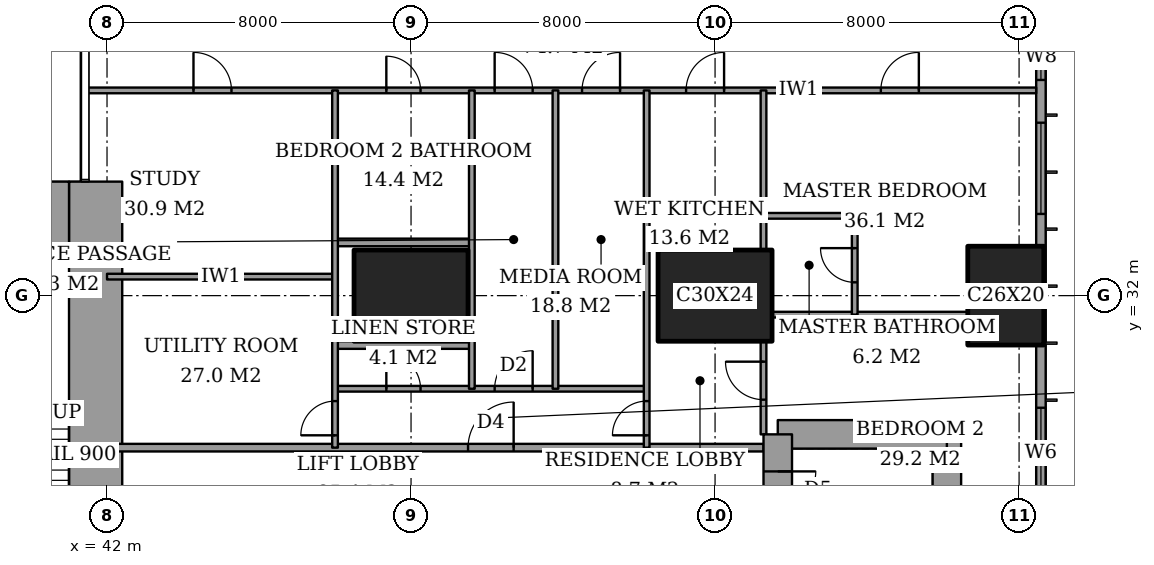
"""IFC4 building model, lengths in metres.
Left out: names, types, materials, properties, quantities, classifications, styles, units other than length and angle.
Written with IfcOpenShell. Run it as: python <this file> out.ifc"""

import sys

from ifc_helpers import new_model, si_unit, direction, frame, frame_2d, origin, origin_2d, place, context, subcontext, project, spatial, rectangle, extrude, element, fill, save


model = new_model("IFC4")
c1 = context("Model", 3, precision=1e-05, world=origin(), true_north=direction((0.0, 1.0)))
c2 = subcontext(c1, "Body", "Model", "MODEL_VIEW")
j1 = project(units=[si_unit("LENGTHUNIT", "METRE"), si_unit("PLANEANGLEUNIT", "RADIAN")], contexts=[c1])
p1 = place(None, origin())
s1 = spatial("IfcSite", under=j1, at=p1, CompositionType="ELEMENT")
p2 = place(p1, origin())
s2 = spatial("IfcBuilding", under=s1, at=p2, CompositionType="ELEMENT")
p3 = place(p2, frame((0.0, 0.0, 76.4)))
s3 = spatial("IfcBuildingStorey", under=s2, at=p3, CompositionType="ELEMENT", Elevation=76.4)
for number, where, z_axis, x_axis in (
    (1, (50.0, 32.0, 0.0), (0.0, 0.0, 1.0), (1.0, 0.0, 0.0)),
    (2, (58.0, 32.0, 0.0), (0.0, 0.0, 1.0), (1.0, 0.0, 0.0)),
):
    element("IfcColumn", number, at=place(p3, frame(where, z_axis=z_axis, x_axis=x_axis)), inside=s3, PredefinedType="COLUMN", context=c2, shape_type="SweptSolid", body=[
        extrude(rectangle(XDim=3.0, YDim=2.4, at=origin_2d()), origin(), (0.0, 0.0, 1.0), 3.6),
    ])
p4 = place(p3, frame((65.65, 32.0, 0.0), z_axis=(0.0, 0.0, 1.0), x_axis=(0.0, 1.0, 0.0)))
e3 = element("IfcColumn", 3, at=p4, inside=s3, PredefinedType="COLUMN", context=c2, shape_type="SweptSolid", body=[
    extrude(rectangle(XDim=2.6, YDim=2.0, at=origin_2d()), origin(), (0.0, 0.0, 1.0), 3.6),
])
p5 = place(p3, frame((37.85, 34.0, 0.0), z_axis=(0.0, 0.0, 1.0), x_axis=(1.0, 0.0, 0.0)))
e4 = element("IfcWall", 4, at=p5, inside=s3, PredefinedType="SHEAR", context=c2, shape_type="SweptSolid", body=[
    extrude(rectangle(XDim=3.15, YDim=2.0, at=frame_2d((1.575, 0.0))), origin(), (0.0, 0.0, 1.0), 3.6),
])
p6 = place(p3, frame((41.7, 24.85, 0.0), z_axis=(0.0, 0.0, 1.0), x_axis=(0.0, 1.0, 0.0)))
e5 = element("IfcWall", 5, at=p6, inside=s3, PredefinedType="SHEAR", context=c2, shape_type="SweptSolid", body=[
    extrude(rectangle(XDim=10.15, YDim=1.4, at=frame_2d((5.075, 0.0))), origin(), (0.0, 0.0, 1.0), 3.6),
])
p7 = place(p3, frame((64.1, 19.65, 0.0), z_axis=(0.0, 0.0, 1.0), x_axis=(0.0, 1.0, 0.0)))
e6 = element("IfcWall", 6, at=p7, inside=s3, PredefinedType="SHEAR", context=c2, shape_type="SweptSolid", body=[
    extrude(rectangle(XDim=8.7, YDim=0.75, at=frame_2d((4.35, 0.0))), origin(), (0.0, 0.0, 1.0), 3.6),
])
p8 = place(p3, frame((64.1, 28.35, 0.0), z_axis=(0.0, 0.0, 1.0), x_axis=(-1.0, 0.0, 0.0)))
e7 = element("IfcWall", 7, at=p8, inside=s3, PredefinedType="SHEAR", context=c2, shape_type="SweptSolid", body=[
    extrude(rectangle(XDim=4.45, YDim=0.75, at=frame_2d((2.225, 0.0))), origin(), (0.0, 0.0, 1.0), 3.6),
])
p9 = place(p3, frame((59.65, 28.35, 0.0), z_axis=(0.0, 0.0, 1.0), x_axis=(0.0, -1.0, 0.0)))
e8 = element("IfcWall", 8, at=p9, inside=s3, PredefinedType="SHEAR", context=c2, shape_type="SweptSolid", body=[
    extrude(rectangle(XDim=8.7, YDim=0.75, at=frame_2d((4.35, 0.0))), origin(), (0.0, 0.0, 1.0), 3.6),
])
p10 = place(p9, frame((0.975, 0.0, 0.0)))
e9 = element("IfcOpeningElement", 9, at=p10, cuts=e8, PredefinedType="OPENING", context=c2, shape_type="SweptSolid", body=[
    extrude(rectangle(XDim=1.0, YDim=2.1, at=frame_2d((0.5, 1.05))), frame((0.0, 0.385, 0.0), z_axis=(0.0, -1.0, 0.0), x_axis=(1.0, 0.0, 0.0)), (0.0, 0.0, 1.0), 0.77),
])
p11 = place(p3, frame((66.575, 3.175, 0.0), z_axis=(0.0, 0.0, 1.0), x_axis=(0.0, 1.0, 0.0)))
e10 = element("IfcWall", 10, at=p11, inside=s3, PredefinedType="SOLIDWALL", context=c2, shape_type="SweptSolid", body=[
    extrude(rectangle(XDim=41.65, YDim=0.25, at=frame_2d((20.825, 0.0))), origin(), (0.0, 0.0, 1.0), 3.6),
])
p12 = place(p11, frame((0.775, 0.0, 0.6)))
e11 = element("IfcOpeningElement", 11, at=p12, cuts=e10, PredefinedType="OPENING", context=c2, shape_type="SweptSolid", body=[
    extrude(rectangle(XDim=2.4, YDim=2.0, at=frame_2d((1.2, 1.0))), frame((0.0, 0.135, 0.0), z_axis=(0.0, -1.0, 0.0), x_axis=(1.0, 0.0, 0.0)), (0.0, 0.0, 1.0), 0.27),
])
p13 = place(p11, frame((6.1, 0.0, 0.6)))
e12 = element("IfcOpeningElement", 12, at=p13, cuts=e10, PredefinedType="OPENING", context=c2, shape_type="SweptSolid", body=[
    extrude(rectangle(XDim=1.2, YDim=2.0, at=frame_2d((0.6, 1.0))), frame((0.0, 0.135, 0.0), z_axis=(0.0, -1.0, 0.0), x_axis=(1.0, 0.0, 0.0)), (0.0, 0.0, 1.0), 0.27),
])
p14 = place(p11, frame((8.275, 0.0, 0.6)))
e13 = element("IfcOpeningElement", 13, at=p14, cuts=e10, PredefinedType="OPENING", context=c2, shape_type="SweptSolid", body=[
    extrude(rectangle(XDim=2.4, YDim=2.0, at=frame_2d((1.2, 1.0))), frame((0.0, 0.135, 0.0), z_axis=(0.0, -1.0, 0.0), x_axis=(1.0, 0.0, 0.0)), (0.0, 0.0, 1.0), 0.27),
])
p15 = place(p11, frame((15.775, 0.0, 0.6)))
e14 = element("IfcOpeningElement", 14, at=p15, cuts=e10, PredefinedType="OPENING", context=c2, shape_type="SweptSolid", body=[
    extrude(rectangle(XDim=2.4, YDim=2.0, at=frame_2d((1.2, 1.0))), frame((0.0, 0.135, 0.0), z_axis=(0.0, -1.0, 0.0), x_axis=(1.0, 0.0, 0.0)), (0.0, 0.0, 1.0), 0.27),
])
p16 = place(p11, frame((23.475, 0.0, 0.6)))
e15 = element("IfcOpeningElement", 15, at=p16, cuts=e10, PredefinedType="OPENING", context=c2, shape_type="SweptSolid", body=[
    extrude(rectangle(XDim=2.4, YDim=2.0, at=frame_2d((1.2, 1.0))), frame((0.0, 0.135, 0.0), z_axis=(0.0, -1.0, 0.0), x_axis=(1.0, 0.0, 0.0)), (0.0, 0.0, 1.0), 0.27),
])
p17 = place(p11, frame((30.975, 0.0, 0.6)))
e16 = element("IfcOpeningElement", 16, at=p17, cuts=e10, PredefinedType="OPENING", context=c2, shape_type="SweptSolid", body=[
    extrude(rectangle(XDim=2.4, YDim=2.0, at=frame_2d((1.2, 1.0))), frame((0.0, 0.135, 0.0), z_axis=(0.0, -1.0, 0.0), x_axis=(1.0, 0.0, 0.0)), (0.0, 0.0, 1.0), 0.27),
])
p18 = place(p11, frame((34.5, 0.0, 0.6)))
e17 = element("IfcOpeningElement", 17, at=p18, cuts=e10, PredefinedType="OPENING", context=c2, shape_type="SweptSolid", body=[
    extrude(rectangle(XDim=1.2, YDim=2.0, at=frame_2d((0.6, 1.0))), frame((0.0, 0.135, 0.0), z_axis=(0.0, -1.0, 0.0), x_axis=(1.0, 0.0, 0.0)), (0.0, 0.0, 1.0), 0.27),
])
p19 = place(p11, frame((38.475, 0.0, 0.6)))
e18 = element("IfcOpeningElement", 18, at=p19, cuts=e10, PredefinedType="OPENING", context=c2, shape_type="SweptSolid", body=[
    extrude(rectangle(XDim=2.4, YDim=2.0, at=frame_2d((1.2, 1.0))), frame((0.0, 0.135, 0.0), z_axis=(0.0, -1.0, 0.0), x_axis=(1.0, 0.0, 0.0)), (0.0, 0.0, 1.0), 0.27),
])
p20 = place(p3, frame((42.0, 28.0, 0.0), z_axis=(0.0, 0.0, 1.0), x_axis=(1.0, 0.0, 0.0)))
e19 = element("IfcWall", 19, at=p20, inside=s3, PredefinedType="PARTITIONING", context=c2, shape_type="SweptSolid", body=[
    extrude(rectangle(XDim=17.275, YDim=0.2, at=frame_2d((8.637, 0.0))), origin(), (0.0, 0.0, 1.0), 3.35),
])
p21 = place(p20, frame((9.5, 0.0, 0.0)))
e20 = element("IfcOpeningElement", 20, at=p21, cuts=e19, PredefinedType="OPENING", context=c2, shape_type="SweptSolid", body=[
    extrude(rectangle(XDim=1.2, YDim=2.4, at=frame_2d((0.6, 1.2))), frame((0.0, 0.11, 0.0), z_axis=(0.0, -1.0, 0.0), x_axis=(1.0, 0.0, 0.0)), (0.0, 0.0, 1.0), 0.22),
])
p22 = place(p3, frame((48.0, 29.55, 0.0), z_axis=(0.0, 0.0, 1.0), x_axis=(1.0, 0.0, 0.0)))
e21 = element("IfcWall", 21, at=p22, inside=s3, PredefinedType="PARTITIONING", context=c2, shape_type="SweptSolid", body=[
    extrude(rectangle(XDim=8.2, YDim=0.15, at=frame_2d((4.1, 0.0))), origin(), (0.0, 0.0, 1.0), 3.35),
])
p23 = place(p22, frame((4.2, 0.0, 0.0)))
e22 = element("IfcOpeningElement", 22, at=p23, cuts=e21, PredefinedType="OPENING", context=c2, shape_type="SweptSolid", body=[
    extrude(rectangle(XDim=1.0, YDim=2.1, at=frame_2d((0.5, 1.05))), frame((0.0, 0.085, 0.0), z_axis=(0.0, -1.0, 0.0), x_axis=(1.0, 0.0, 0.0)), (0.0, 0.0, 1.0), 0.17),
])
p24 = place(p22, frame((1.35, 0.0, 0.0)))
e23 = element("IfcOpeningElement", 23, at=p24, cuts=e21, PredefinedType="OPENING", context=c2, shape_type="SweptSolid", body=[
    extrude(rectangle(XDim=0.9, YDim=2.1, at=frame_2d((0.45, 1.05))), frame((0.0, 0.085, 0.0), z_axis=(0.0, -1.0, 0.0), x_axis=(1.0, 0.0, 0.0)), (0.0, 0.0, 1.0), 0.17),
])
p25 = place(p3, frame((48.0, 30.7, 0.0), z_axis=(0.0, 0.0, 1.0), x_axis=(1.0, 0.0, 0.0)))
e24 = element("IfcWall", 24, at=p25, inside=s3, PredefinedType="PARTITIONING", context=c2, shape_type="SweptSolid", body=[
    extrude(rectangle(XDim=3.6, YDim=0.2, at=frame_2d((1.8, 0.0))), origin(), (0.0, 0.0, 1.0), 3.35),
])
p26 = place(p3, frame((59.5, 31.5, 0.0), z_axis=(0.0, 0.0, 1.0), x_axis=(1.0, 0.0, 0.0)))
e25 = element("IfcWall", 25, at=p26, inside=s3, PredefinedType="PARTITIONING", context=c2, shape_type="SweptSolid", body=[
    extrude(rectangle(XDim=5.15, YDim=0.15, at=frame_2d((2.575, 0.0))), origin(), (0.0, 0.0, 1.0), 3.35),
])
p27 = place(p3, frame((42.0, 32.5, 0.0), z_axis=(0.0, 0.0, 1.0), x_axis=(1.0, 0.0, 0.0)))
e26 = element("IfcWall", 26, at=p27, inside=s3, PredefinedType="PARTITIONING", context=c2, shape_type="SweptSolid", body=[
    extrude(rectangle(XDim=6.0, YDim=0.15, at=frame_2d((3.0, 0.0))), origin(), (0.0, 0.0, 1.0), 3.35),
])
p28 = place(p3, frame((48.0, 33.4, 0.0), z_axis=(0.0, 0.0, 1.0), x_axis=(1.0, 0.0, 0.0)))
e27 = element("IfcWall", 27, at=p28, inside=s3, PredefinedType="PARTITIONING", context=c2, shape_type="SweptSolid", body=[
    extrude(rectangle(XDim=3.6, YDim=0.2, at=frame_2d((1.8, 0.0))), origin(), (0.0, 0.0, 1.0), 3.35),
])
p29 = place(p3, frame((59.275, 34.1, 0.0), z_axis=(0.0, 0.0, 1.0), x_axis=(1.0, 0.0, 0.0)))
e28 = element("IfcWall", 28, at=p29, inside=s3, PredefinedType="PARTITIONING", context=c2, shape_type="SweptSolid", body=[
    extrude(rectangle(XDim=2.4, YDim=0.15, at=frame_2d((1.2, 0.0))), origin(), (0.0, 0.0, 1.0), 3.35),
])
p30 = place(p3, frame((41.439, 37.4, 0.0), z_axis=(0.0, 0.0, 1.0), x_axis=(1.0, 0.0, 0.0)))
e29 = element("IfcWall", 29, at=p30, inside=s3, PredefinedType="PARTITIONING", context=c2, shape_type="SweptSolid", body=[
    extrude(rectangle(XDim=25.011, YDim=0.15, at=frame_2d((12.505, 0.0))), origin(), (0.0, 0.0, 1.0), 3.35),
])
p31 = place(p30, frame((10.761, 0.0, 0.0)))
e30 = element("IfcOpeningElement", 30, at=p31, cuts=e29, PredefinedType="OPENING", context=c2, shape_type="SweptSolid", body=[
    extrude(rectangle(XDim=1.0, YDim=2.1, at=frame_2d((0.5, 1.05))), frame((0.0, 0.085, 0.0), z_axis=(0.0, -1.0, 0.0), x_axis=(1.0, 0.0, 0.0)), (0.0, 0.0, 1.0), 0.17),
])
p32 = place(p30, frame((20.924, 0.0, 0.0)))
e31 = element("IfcOpeningElement", 31, at=p32, cuts=e29, PredefinedType="OPENING", context=c2, shape_type="SweptSolid", body=[
    extrude(rectangle(XDim=1.0, YDim=2.1, at=frame_2d((0.5, 1.05))), frame((0.0, 0.085, 0.0), z_axis=(0.0, -1.0, 0.0), x_axis=(1.0, 0.0, 0.0)), (0.0, 0.0, 1.0), 0.17),
])
p33 = place(p30, frame((15.799, 0.0, 0.0)))
e32 = element("IfcOpeningElement", 32, at=p33, cuts=e29, PredefinedType="OPENING", context=c2, shape_type="SweptSolid", body=[
    extrude(rectangle(XDim=1.0, YDim=2.1, at=frame_2d((0.5, 1.05))), frame((0.0, 0.085, 0.0), z_axis=(0.0, -1.0, 0.0), x_axis=(1.0, 0.0, 0.0)), (0.0, 0.0, 1.0), 0.17),
])
p34 = place(p30, frame((13.061, 0.0, 0.0)))
e33 = element("IfcOpeningElement", 33, at=p34, cuts=e29, PredefinedType="OPENING", context=c2, shape_type="SweptSolid", body=[
    extrude(rectangle(XDim=1.0, YDim=2.1, at=frame_2d((0.5, 1.05))), frame((0.0, 0.085, 0.0), z_axis=(0.0, -1.0, 0.0), x_axis=(1.0, 0.0, 0.0)), (0.0, 0.0, 1.0), 0.17),
])
p35 = place(p30, frame((7.911, 0.0, 0.0)))
e34 = element("IfcOpeningElement", 34, at=p35, cuts=e29, PredefinedType="OPENING", context=c2, shape_type="SweptSolid", body=[
    extrude(rectangle(XDim=0.9, YDim=2.1, at=frame_2d((0.45, 1.05))), frame((0.0, 0.085, 0.0), z_axis=(0.0, -1.0, 0.0), x_axis=(1.0, 0.0, 0.0)), (0.0, 0.0, 1.0), 0.17),
])
p36 = place(p30, frame((2.836, 0.0, 0.0)))
e35 = element("IfcOpeningElement", 35, at=p36, cuts=e29, PredefinedType="OPENING", context=c2, shape_type="SweptSolid", body=[
    extrude(rectangle(XDim=1.0, YDim=2.1, at=frame_2d((0.5, 1.05))), frame((0.0, 0.085, 0.0), z_axis=(0.0, -1.0, 0.0), x_axis=(1.0, 0.0, 0.0)), (0.0, 0.0, 1.0), 0.17),
])
p37 = place(p3, frame((48.0, 28.0, 0.0), z_axis=(0.0, 0.0, 1.0), x_axis=(0.0, 1.0, 0.0)))
e36 = element("IfcWall", 36, at=p37, inside=s3, PredefinedType="PARTITIONING", context=c2, shape_type="SweptSolid", body=[
    extrude(rectangle(XDim=9.4, YDim=0.15, at=frame_2d((4.7, 0.0))), origin(), (0.0, 0.0, 1.0), 3.35),
])
p38 = place(p37, frame((0.325, 0.0, 0.0)))
e37 = element("IfcOpeningElement", 37, at=p38, cuts=e36, PredefinedType="OPENING", context=c2, shape_type="SweptSolid", body=[
    extrude(rectangle(XDim=0.9, YDim=2.1, at=frame_2d((0.45, 1.05))), frame((0.0, 0.085, 0.0), z_axis=(0.0, -1.0, 0.0), x_axis=(1.0, 0.0, 0.0)), (0.0, 0.0, 1.0), 0.17),
])
for number, where, z_axis, x_axis in (
    (38, (51.6, 29.55, 0.0), (0.0, 0.0, 1.0), (0.0, 1.0, 0.0)),
    (39, (53.8, 29.55, 0.0), (0.0, 0.0, 1.0), (0.0, 1.0, 0.0)),
):
    element("IfcWall", number, at=place(p3, frame(where, z_axis=z_axis, x_axis=x_axis)), inside=s3, PredefinedType="PARTITIONING", context=c2, shape_type="SweptSolid", body=[
        extrude(rectangle(XDim=7.85, YDim=0.15, at=frame_2d((3.925, 0.0))), origin(), (0.0, 0.0, 1.0), 3.35),
    ])
p39 = place(p3, frame((56.2, 28.0, 0.0), z_axis=(0.0, 0.0, 1.0), x_axis=(0.0, 1.0, 0.0)))
e40 = element("IfcWall", 40, at=p39, inside=s3, PredefinedType="PARTITIONING", context=c2, shape_type="SweptSolid", body=[
    extrude(rectangle(XDim=9.4, YDim=0.15, at=frame_2d((4.7, 0.0))), origin(), (0.0, 0.0, 1.0), 3.35),
])
p40 = place(p39, frame((0.325, 0.0, 0.0)))
e41 = element("IfcOpeningElement", 41, at=p40, cuts=e40, PredefinedType="OPENING", context=c2, shape_type="SweptSolid", body=[
    extrude(rectangle(XDim=0.9, YDim=2.1, at=frame_2d((0.45, 1.05))), frame((0.0, 0.085, 0.0), z_axis=(0.0, -1.0, 0.0), x_axis=(1.0, 0.0, 0.0)), (0.0, 0.0, 1.0), 0.17),
])
p41 = place(p3, frame((59.275, 28.35, 0.0), z_axis=(0.0, 0.0, 1.0), x_axis=(0.0, 1.0, 0.0)))
e42 = element("IfcWall", 42, at=p41, inside=s3, PredefinedType="PARTITIONING", context=c2, shape_type="SweptSolid", body=[
    extrude(rectangle(XDim=2.45, YDim=0.15, at=frame_2d((1.225, 0.0))), origin(), (0.0, 0.0, 1.0), 3.35),
])
p42 = place(p41, frame((0.913, 0.0, 0.0)))
e43 = element("IfcOpeningElement", 43, at=p42, cuts=e42, PredefinedType="OPENING", context=c2, shape_type="SweptSolid", body=[
    extrude(rectangle(XDim=1.0, YDim=2.1, at=frame_2d((0.5, 1.05))), frame((0.0, 0.085, 0.0), z_axis=(0.0, -1.0, 0.0), x_axis=(1.0, 0.0, 0.0)), (0.0, 0.0, 1.0), 0.17),
])
p43 = place(p3, frame((59.275, 33.2, 0.0), z_axis=(0.0, 0.0, 1.0), x_axis=(0.0, 1.0, 0.0)))
e44 = element("IfcWall", 44, at=p43, inside=s3, PredefinedType="PARTITIONING", context=c2, shape_type="SweptSolid", body=[
    extrude(rectangle(XDim=4.2, YDim=0.15, at=frame_2d((2.1, 0.0))), origin(), (0.0, 0.0, 1.0), 3.35),
])
p44 = place(p3, frame((61.675, 31.5, 0.0), z_axis=(0.0, 0.0, 1.0), x_axis=(0.0, 1.0, 0.0)))
e45 = element("IfcWall", 45, at=p44, inside=s3, PredefinedType="PARTITIONING", context=c2, shape_type="SweptSolid", body=[
    extrude(rectangle(XDim=2.6, YDim=0.15, at=frame_2d((1.3, 0.0))), origin(), (0.0, 0.0, 1.0), 3.35),
])
p45 = place(p44, frame((0.85, 0.0, 0.0)))
e46 = element("IfcOpeningElement", 46, at=p45, cuts=e45, PredefinedType="OPENING", context=c2, shape_type="SweptSolid", body=[
    extrude(rectangle(XDim=0.9, YDim=2.1, at=frame_2d((0.45, 1.05))), frame((0.0, 0.085, 0.0), z_axis=(0.0, -1.0, 0.0), x_axis=(1.0, 0.0, 0.0)), (0.0, 0.0, 1.0), 0.17),
])
p46 = place(p16, origin())
e47 = element("IfcWindow", 47, at=p46, inside=s3, PartitioningType="SINGLE_PANEL", PredefinedType="WINDOW", context=c2, shape_type="SweptSolid", body=[
    extrude(rectangle(XDim=2.4, YDim=2.0, at=frame_2d((1.2, 1.0))), frame((0.0, 0.03, 0.0), z_axis=(0.0, -1.0, 0.0), x_axis=(1.0, 0.0, 0.0)), (0.0, 0.0, 1.0), 0.06),
])
fill(e15, e47)
p47 = place(p17, origin())
e48 = element("IfcWindow", 48, at=p47, inside=s3, PartitioningType="SINGLE_PANEL", PredefinedType="WINDOW", context=c2, shape_type="SweptSolid", body=[
    extrude(rectangle(XDim=2.4, YDim=2.0, at=frame_2d((1.2, 1.0))), frame((0.0, 0.03, 0.0), z_axis=(0.0, -1.0, 0.0), x_axis=(1.0, 0.0, 0.0)), (0.0, 0.0, 1.0), 0.06),
])
fill(e16, e48)
p48 = place(p18, origin())
e49 = element("IfcWindow", 49, at=p48, inside=s3, PartitioningType="SINGLE_PANEL", PredefinedType="WINDOW", context=c2, shape_type="SweptSolid", body=[
    extrude(rectangle(XDim=1.2, YDim=2.0, at=frame_2d((0.6, 1.0))), frame((0.0, 0.03, 0.0), z_axis=(0.0, -1.0, 0.0), x_axis=(1.0, 0.0, 0.0)), (0.0, 0.0, 1.0), 0.06),
])
fill(e17, e49)
p49 = place(p31, origin())
e50 = element("IfcDoor", 50, at=p49, inside=s3, OperationType="SINGLE_SWING_RIGHT", PredefinedType="DOOR", context=c2, shape_type="SweptSolid", body=[
    extrude(rectangle(XDim=1.0, YDim=2.1, at=frame_2d((0.5, 1.05))), frame((0.0, 0.025, 0.0), z_axis=(0.0, -1.0, 0.0), x_axis=(1.0, 0.0, 0.0)), (0.0, 0.0, 1.0), 0.05),
])
fill(e30, e50)
p50 = place(p45, origin())
e51 = element("IfcDoor", 51, at=p50, inside=s3, OperationType="SINGLE_SWING_LEFT", PredefinedType="DOOR", context=c2, shape_type="SweptSolid", body=[
    extrude(rectangle(XDim=0.9, YDim=2.1, at=frame_2d((0.45, 1.05))), frame((0.0, 0.025, 0.0), z_axis=(0.0, -1.0, 0.0), x_axis=(1.0, 0.0, 0.0)), (0.0, 0.0, 1.0), 0.05),
])
fill(e46, e51)
p51 = place(p32, origin())
e52 = element("IfcDoor", 52, at=p51, inside=s3, OperationType="SINGLE_SWING_LEFT", PredefinedType="DOOR", context=c2, shape_type="SweptSolid", body=[
    extrude(rectangle(XDim=1.0, YDim=2.1, at=frame_2d((0.5, 1.05))), frame((0.0, 0.025, 0.0), z_axis=(0.0, -1.0, 0.0), x_axis=(1.0, 0.0, 0.0)), (0.0, 0.0, 1.0), 0.05),
])
fill(e31, e52)
p52 = place(p42, origin())
e53 = element("IfcDoor", 53, at=p52, inside=s3, OperationType="SINGLE_SWING_LEFT", PredefinedType="DOOR", context=c2, shape_type="SweptSolid", body=[
    extrude(rectangle(XDim=1.0, YDim=2.1, at=frame_2d((0.5, 1.05))), frame((0.0, 0.025, 0.0), z_axis=(0.0, -1.0, 0.0), x_axis=(1.0, 0.0, 0.0)), (0.0, 0.0, 1.0), 0.05),
])
fill(e43, e53)
p53 = place(p33, origin())
e54 = element("IfcDoor", 54, at=p53, inside=s3, OperationType="SINGLE_SWING_LEFT", PredefinedType="DOOR", context=c2, shape_type="SweptSolid", body=[
    extrude(rectangle(XDim=1.0, YDim=2.1, at=frame_2d((0.5, 1.05))), frame((0.0, 0.025, 0.0), z_axis=(0.0, -1.0, 0.0), x_axis=(1.0, 0.0, 0.0)), (0.0, 0.0, 1.0), 0.05),
])
fill(e32, e54)
p54 = place(p40, origin())
e55 = element("IfcDoor", 55, at=p54, inside=s3, OperationType="SINGLE_SWING_RIGHT", PredefinedType="DOOR", context=c2, shape_type="SweptSolid", body=[
    extrude(rectangle(XDim=0.9, YDim=2.1, at=frame_2d((0.45, 1.05))), frame((0.0, 0.025, 0.0), z_axis=(0.0, -1.0, 0.0), x_axis=(1.0, 0.0, 0.0)), (0.0, 0.0, 1.0), 0.05),
])
fill(e41, e55)
p55 = place(p21, origin())
e56 = element("IfcDoor", 56, at=p55, inside=s3, OperationType="SINGLE_SWING_LEFT", PredefinedType="DOOR", context=c2, shape_type="SweptSolid", body=[
    extrude(rectangle(XDim=1.2, YDim=2.4, at=frame_2d((0.6, 1.2))), frame((0.0, 0.025, 0.0), z_axis=(0.0, -1.0, 0.0), x_axis=(1.0, 0.0, 0.0)), (0.0, 0.0, 1.0), 0.05),
])
fill(e20, e56)
p56 = place(p34, origin())
e57 = element("IfcDoor", 57, at=p56, inside=s3, OperationType="SINGLE_SWING_LEFT", PredefinedType="DOOR", context=c2, shape_type="SweptSolid", body=[
    extrude(rectangle(XDim=1.0, YDim=2.1, at=frame_2d((0.5, 1.05))), frame((0.0, 0.025, 0.0), z_axis=(0.0, -1.0, 0.0), x_axis=(1.0, 0.0, 0.0)), (0.0, 0.0, 1.0), 0.05),
])
fill(e33, e57)
p57 = place(p23, origin())
e58 = element("IfcDoor", 58, at=p57, inside=s3, OperationType="SINGLE_SWING_LEFT", PredefinedType="DOOR", context=c2, shape_type="SweptSolid", body=[
    extrude(rectangle(XDim=1.0, YDim=2.1, at=frame_2d((0.5, 1.05))), frame((0.0, 0.025, 0.0), z_axis=(0.0, -1.0, 0.0), x_axis=(1.0, 0.0, 0.0)), (0.0, 0.0, 1.0), 0.05),
])
fill(e22, e58)
p58 = place(p24, origin())
e59 = element("IfcDoor", 59, at=p58, inside=s3, OperationType="SINGLE_SWING_RIGHT", PredefinedType="DOOR", context=c2, shape_type="SweptSolid", body=[
    extrude(rectangle(XDim=0.9, YDim=2.1, at=frame_2d((0.45, 1.05))), frame((0.0, 0.025, 0.0), z_axis=(0.0, -1.0, 0.0), x_axis=(1.0, 0.0, 0.0)), (0.0, 0.0, 1.0), 0.05),
])
fill(e23, e59)
p59 = place(p35, origin())
e60 = element("IfcDoor", 60, at=p59, inside=s3, OperationType="SINGLE_SWING_RIGHT", PredefinedType="DOOR", context=c2, shape_type="SweptSolid", body=[
    extrude(rectangle(XDim=0.9, YDim=2.1, at=frame_2d((0.45, 1.05))), frame((0.0, 0.025, 0.0), z_axis=(0.0, -1.0, 0.0), x_axis=(1.0, 0.0, 0.0)), (0.0, 0.0, 1.0), 0.05),
])
fill(e34, e60)
p60 = place(p36, origin())
e61 = element("IfcDoor", 61, at=p60, inside=s3, OperationType="SINGLE_SWING_RIGHT", PredefinedType="DOOR", context=c2, shape_type="SweptSolid", body=[
    extrude(rectangle(XDim=1.0, YDim=2.1, at=frame_2d((0.5, 1.05))), frame((0.0, 0.025, 0.0), z_axis=(0.0, -1.0, 0.0), x_axis=(1.0, 0.0, 0.0)), (0.0, 0.0, 1.0), 0.05),
])
fill(e35, e61)
p61 = place(p38, origin())
e62 = element("IfcDoor", 62, at=p61, inside=s3, OperationType="SINGLE_SWING_RIGHT", PredefinedType="DOOR", context=c2, shape_type="SweptSolid", body=[
    extrude(rectangle(XDim=0.9, YDim=2.1, at=frame_2d((0.45, 1.05))), frame((0.0, 0.025, 0.0), z_axis=(0.0, -1.0, 0.0), x_axis=(1.0, 0.0, 0.0)), (0.0, 0.0, 1.0), 0.05),
])
fill(e37, e62)
p62 = place(p10, origin())
e63 = element("IfcDoor", 63, at=p62, inside=s3, OperationType="SINGLE_SWING_RIGHT", PredefinedType="DOOR", context=c2, shape_type="SweptSolid", body=[
    extrude(rectangle(XDim=1.0, YDim=2.1, at=frame_2d((0.5, 1.05))), frame((0.0, 0.025, 0.0), z_axis=(0.0, -1.0, 0.0), x_axis=(1.0, 0.0, 0.0)), (0.0, 0.0, 1.0), 0.05),
])
fill(e9, e63)
save(model, sys.argv[1])
